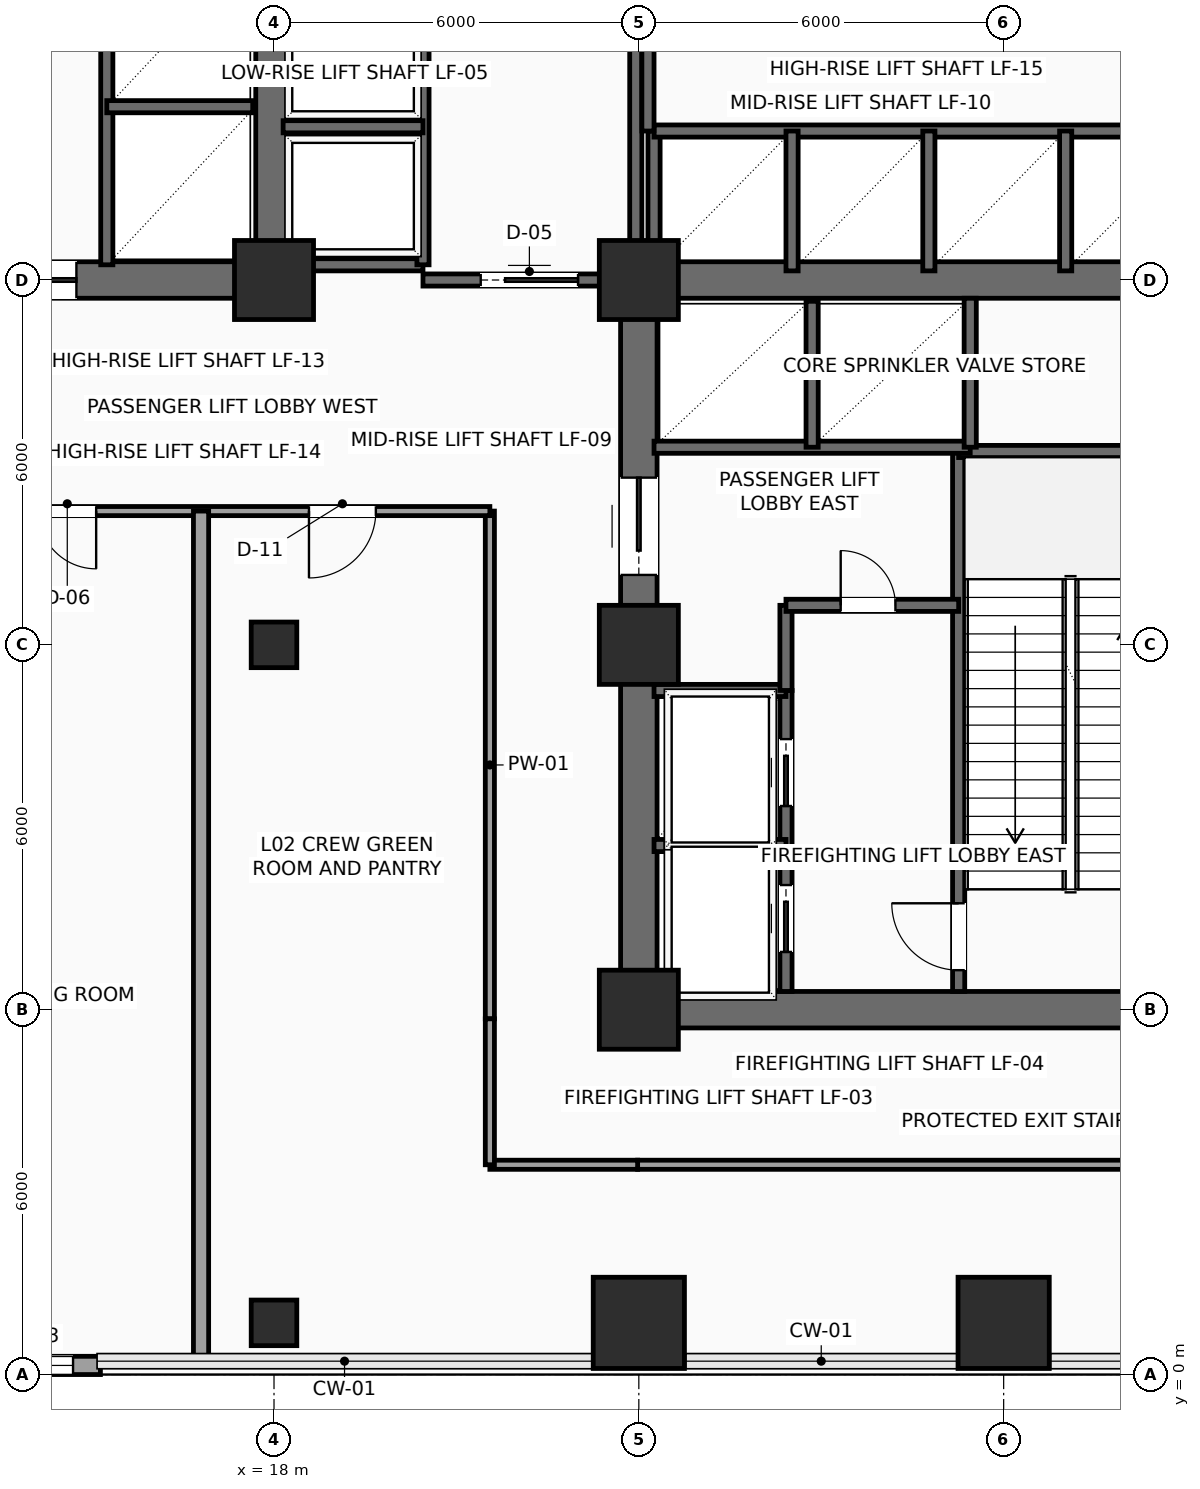
"""IFC4 building model, lengths in metres.
Left out: names, types, materials, properties, quantities, classifications, styles, units other than length and angle.
Written with IfcOpenShell. Run it as: python <this file> out.ifc"""

import sys

from ifc_helpers import new_model, si_unit, direction, frame, frame_2d, origin, origin_2d, place, context, subcontext, project, spatial, rectangle, hollow_rectangle, extrude, element, fill, save


model = new_model("IFC4")
c1 = context("Model", 3, precision=1e-05, world=origin(), true_north=direction((0.0, 1.0)))
c2 = subcontext(c1, "Body", "Model", "MODEL_VIEW")
j1 = project(units=[si_unit("LENGTHUNIT", "METRE"), si_unit("PLANEANGLEUNIT", "RADIAN")], contexts=[c1])
p1 = place(None, origin())
s1 = spatial("IfcSite", under=j1, at=p1, CompositionType="ELEMENT")
p2 = place(p1, origin())
s2 = spatial("IfcBuilding", under=s1, at=p2, CompositionType="ELEMENT")
p3 = place(p2, frame((0.0, 0.0, 11.1)))
s3 = spatial("IfcBuildingStorey", under=s2, at=p3, CompositionType="ELEMENT", Elevation=11.1)
for number, where, z_axis, x_axis in (
    (1, (18.0, 18.0, 0.0), (0.0, 0.0, 1.0), (1.0, 0.0, 0.0)),
    (2, (24.0, 6.0, 0.0), (0.0, 0.0, 1.0), (1.0, 0.0, 0.0)),
    (3, (24.0, 12.0, 0.0), (0.0, 0.0, 1.0), (1.0, 0.0, 0.0)),
    (4, (24.0, 18.0, 0.0), (0.0, 0.0, 1.0), (1.0, 0.0, 0.0)),
):
    element("IfcColumn", number, at=place(p3, frame(where, z_axis=z_axis, x_axis=x_axis)), inside=s3, PredefinedType="COLUMN", context=c2, shape_type="SweptSolid", body=[
        extrude(rectangle(XDim=1.3, YDim=1.3, at=origin_2d()), origin(), (0.0, 0.0, 1.0), 5.4),
    ])
for number, where, z_axis, x_axis in (
    (5, (18.0, 0.85, 0.0), (0.0, 0.0, 1.0), (1.0, 0.0, 0.0)),
    (6, (18.0, 12.0, 0.0), (0.0, 0.0, 1.0), (1.0, 0.0, 0.0)),
):
    element("IfcColumn", number, at=place(p3, frame(where, z_axis=z_axis, x_axis=x_axis)), inside=s3, PredefinedType="COLUMN", context=c2, shape_type="SweptSolid", body=[
        extrude(hollow_rectangle(XDim=0.75, YDim=0.75, WallThickness=0.035, InnerFilletRadius=0.035, OuterFilletRadius=0.05, at=origin_2d()), origin(), (0.0, 0.0, 1.0), 5.4),
    ])
for number, where, z_axis, x_axis in (
    (7, (24.0, 0.85, 0.0), (0.0, 0.0, 1.0), (1.0, 0.0, 0.0)),
    (8, (30.0, 0.85, 0.0), (0.0, 0.0, 1.0), (1.0, 0.0, 0.0)),
):
    element("IfcColumn", number, at=place(p3, frame(where, z_axis=z_axis, x_axis=x_axis)), inside=s3, PredefinedType="COLUMN", context=c2, shape_type="SweptSolid", body=[
        extrude(rectangle(XDim=1.5, YDim=1.5, at=origin_2d()), origin(), (0.0, 0.0, 1.0), 5.4),
    ])
p4 = place(p3, frame((15.145, 0.15, 0.0), z_axis=(0.0, 0.0, 1.0), x_axis=(-1.0, 0.0, 0.0)))
e9 = element("IfcWall", 9, at=p4, inside=s3, PredefinedType="SOLIDWALL", context=c2, shape_type="SweptSolid", body=[
    extrude(rectangle(XDim=12.145, YDim=0.3, at=frame_2d((6.073, 0.0))), origin(), (0.0, 0.0, 1.0), 5.1),
])
p5 = place(p4, frame((0.45, 0.0, 1.0)))
e10 = element("IfcOpeningElement", 10, at=p5, cuts=e9, PredefinedType="OPENING", context=c2, shape_type="SweptSolid", body=[
    extrude(rectangle(XDim=1.5, YDim=1.8, at=frame_2d((0.75, 0.9))), frame((0.0, 0.16, 0.0), z_axis=(0.0, -1.0, 0.0), x_axis=(1.0, 0.0, 0.0)), (0.0, 0.0, 1.0), 0.32),
])
p6 = place(p3, frame((6.0, 18.0, 0.0), z_axis=(0.0, 0.0, 1.0), x_axis=(1.0, 0.0, 0.0)))
e11 = element("IfcWall", 11, at=p6, inside=s3, PredefinedType="SHEAR", context=c2, shape_type="SweptSolid", body=[
    extrude(rectangle(XDim=12.0, YDim=0.6, at=frame_2d((6.0, 0.0))), origin(), (0.0, 0.0, 1.0), 5.1),
])
p7 = place(p6, frame((7.15, 0.0, 0.0)))
e12 = element("IfcOpeningElement", 12, at=p7, cuts=e11, PredefinedType="OPENING", context=c2, shape_type="SweptSolid", body=[
    extrude(rectangle(XDim=1.6, YDim=2.3, at=frame_2d((0.8, 1.15))), frame((0.0, 0.31, 0.0), z_axis=(0.0, -1.0, 0.0), x_axis=(1.0, 0.0, 0.0)), (0.0, 0.0, 1.0), 0.62),
])
for number, where, z_axis, x_axis in (
    (13, (18.0, 18.0, 0.0), (0.0, 0.0, 1.0), (0.0, 1.0, 0.0)),
    (14, (24.0, 6.0, 0.0), (0.0, 0.0, 1.0), (1.0, 0.0, 0.0)),
    (15, (24.0, 18.0, 0.0), (0.0, 0.0, 1.0), (1.0, 0.0, 0.0)),
):
    element("IfcWall", number, at=place(p3, frame(where, z_axis=z_axis, x_axis=x_axis)), inside=s3, PredefinedType="SHEAR", context=c2, shape_type="SweptSolid", body=[
        extrude(rectangle(XDim=9.6, YDim=0.6, at=frame_2d((4.8, 0.0))), origin(), (0.0, 0.0, 1.0), 5.1),
    ])
p8 = place(p3, frame((24.0, 6.0, 0.0), z_axis=(0.0, 0.0, 1.0), x_axis=(0.0, 1.0, 0.0)))
e16 = element("IfcWall", 16, at=p8, inside=s3, PredefinedType="SHEAR", context=c2, shape_type="SweptSolid", body=[
    extrude(rectangle(XDim=12.0, YDim=0.6, at=frame_2d((6.0, 0.0))), origin(), (0.0, 0.0, 1.0), 5.1),
])
p9 = place(p8, frame((7.15, 0.0, 0.0)))
e17 = element("IfcOpeningElement", 17, at=p9, cuts=e16, PredefinedType="OPENING", context=c2, shape_type="SweptSolid", body=[
    extrude(rectangle(XDim=1.6, YDim=2.3, at=frame_2d((0.8, 1.15))), frame((0.0, 0.31, 0.0), z_axis=(0.0, -1.0, 0.0), x_axis=(1.0, 0.0, 0.0)), (0.0, 0.0, 1.0), 0.62),
])
p10 = place(p3, frame((29.26, 6.3, 0.0), z_axis=(0.0, 0.0, 1.0), x_axis=(0.0, 1.0, 0.0)))
e18 = element("IfcWall", 18, at=p10, inside=s3, PredefinedType="SHEAR", context=c2, shape_type="SweptSolid", body=[
    extrude(rectangle(XDim=8.88, YDim=0.2, at=frame_2d((4.44, 0.0))), origin(), (0.0, 0.0, 1.0), 5.1),
])
p11 = place(p10, frame((0.35, 0.0, 0.0)))
e19 = element("IfcOpeningElement", 19, at=p11, cuts=e18, PredefinedType="OPENING", context=c2, shape_type="SweptSolid", body=[
    extrude(rectangle(XDim=1.1, YDim=2.2, at=frame_2d((0.55, 1.1))), frame((0.0, 0.11, 0.0), z_axis=(0.0, -1.0, 0.0), x_axis=(1.0, 0.0, 0.0)), (0.0, 0.0, 1.0), 0.22),
])
p12 = place(p3, frame((29.26, 15.18, 0.0), z_axis=(0.0, 0.0, 1.0), x_axis=(1.0, 0.0, 0.0)))
e20 = element("IfcWall", 20, at=p12, inside=s3, PredefinedType="SHEAR", context=c2, shape_type="SweptSolid", body=[
    extrude(rectangle(XDim=4.04, YDim=0.2, at=frame_2d((2.02, 0.0))), origin(), (0.0, 0.0, 1.0), 5.1),
])
p13 = place(p3, frame((26.42, 6.3, 0.0), z_axis=(0.0, 0.0, 1.0), x_axis=(0.0, 1.0, 0.0)))
e21 = element("IfcWall", 21, at=p13, inside=s3, PredefinedType="SHEAR", context=c2, shape_type="SweptSolid", body=[
    extrude(rectangle(XDim=4.95, YDim=0.2, at=frame_2d((2.475, 0.0))), origin(), (0.0, 0.0, 1.0), 5.1),
])
p14 = place(p13, frame((0.65, 0.0, 0.0)))
e22 = element("IfcOpeningElement", 22, at=p14, cuts=e21, PredefinedType="OPENING", context=c2, shape_type="SweptSolid", body=[
    extrude(rectangle(XDim=1.1, YDim=2.2, at=frame_2d((0.55, 1.1))), frame((0.0, 0.11, 0.0), z_axis=(0.0, -1.0, 0.0), x_axis=(1.0, 0.0, 0.0)), (0.0, 0.0, 1.0), 0.22),
])
p15 = place(p13, frame((3.05, 0.0, 0.0)))
e23 = element("IfcOpeningElement", 23, at=p15, cuts=e21, PredefinedType="OPENING", context=c2, shape_type="SweptSolid", body=[
    extrude(rectangle(XDim=1.1, YDim=2.2, at=frame_2d((0.55, 1.1))), frame((0.0, 0.11, 0.0), z_axis=(0.0, -1.0, 0.0), x_axis=(1.0, 0.0, 0.0)), (0.0, 0.0, 1.0), 0.22),
])
for number, where, z_axis, x_axis in (
    (24, (24.25, 8.7, 0.0), (0.0, 0.0, 1.0), (1.0, 0.0, 0.0)),
    (25, (24.25, 11.25, 0.0), (0.0, 0.0, 1.0), (1.0, 0.0, 0.0)),
):
    element("IfcWall", number, at=place(p3, frame(where, z_axis=z_axis, x_axis=x_axis)), inside=s3, PredefinedType="SHEAR", context=c2, shape_type="SweptSolid", body=[
        extrude(rectangle(XDim=2.17, YDim=0.2, at=frame_2d((1.085, 0.0))), origin(), (0.0, 0.0, 1.0), 5.1),
    ])
p16 = place(p3, frame((26.42, 11.25, 0.0), z_axis=(0.0, 0.0, 1.0), x_axis=(0.0, 1.0, 0.0)))
e26 = element("IfcWall", 26, at=p16, inside=s3, PredefinedType="SHEAR", context=c2, shape_type="SweptSolid", body=[
    extrude(rectangle(XDim=1.4, YDim=0.2, at=frame_2d((0.7, 0.0))), origin(), (0.0, 0.0, 1.0), 5.1),
])
p17 = place(p3, frame((26.42, 12.65, 0.0), z_axis=(0.0, 0.0, 1.0), x_axis=(1.0, 0.0, 0.0)))
e27 = element("IfcWall", 27, at=p17, inside=s3, PredefinedType="SHEAR", context=c2, shape_type="SweptSolid", body=[
    extrude(rectangle(XDim=2.84, YDim=0.2, at=frame_2d((1.42, 0.0))), origin(), (0.0, 0.0, 1.0), 5.1),
])
p18 = place(p17, frame((0.9, 0.0, 0.0)))
e28 = element("IfcOpeningElement", 28, at=p18, cuts=e27, PredefinedType="OPENING", context=c2, shape_type="SweptSolid", body=[
    extrude(rectangle(XDim=0.9, YDim=2.15, at=frame_2d((0.45, 1.075))), frame((0.0, 0.11, 0.0), z_axis=(0.0, -1.0, 0.0), x_axis=(1.0, 0.0, 0.0)), (0.0, 0.0, 1.0), 0.22),
])
p19 = place(p3, frame((15.25, 18.25, 0.0), z_axis=(0.0, 0.0, 1.0), x_axis=(0.0, 1.0, 0.0)))
e29 = element("IfcWall", 29, at=p19, inside=s3, PredefinedType="SHEAR", context=c2, shape_type="SweptSolid", body=[
    extrude(rectangle(XDim=5.2, YDim=0.2, at=frame_2d((2.6, 0.0))), origin(), (0.0, 0.0, 1.0), 5.1),
])
p20 = place(p3, frame((15.25, 20.85, 0.0), z_axis=(0.0, 0.0, 1.0), x_axis=(1.0, 0.0, 0.0)))
e30 = element("IfcWall", 30, at=p20, inside=s3, PredefinedType="SHEAR", context=c2, shape_type="SweptSolid", body=[
    extrude(rectangle(XDim=2.4, YDim=0.2, at=frame_2d((1.2, 0.0))), origin(), (0.0, 0.0, 1.0), 5.1),
])
p21 = place(p3, frame((24.25, 15.25, 0.0), z_axis=(0.0, 0.0, 1.0), x_axis=(1.0, 0.0, 0.0)))
e31 = element("IfcWall", 31, at=p21, inside=s3, PredefinedType="SHEAR", context=c2, shape_type="SweptSolid", body=[
    extrude(rectangle(XDim=5.2, YDim=0.2, at=frame_2d((2.6, 0.0))), origin(), (0.0, 0.0, 1.0), 5.1),
])
p22 = place(p3, frame((26.85, 15.25, 0.0), z_axis=(0.0, 0.0, 1.0), x_axis=(0.0, 1.0, 0.0)))
e32 = element("IfcWall", 32, at=p22, inside=s3, PredefinedType="SHEAR", context=c2, shape_type="SweptSolid", body=[
    extrude(rectangle(XDim=2.4, YDim=0.2, at=frame_2d((1.2, 0.0))), origin(), (0.0, 0.0, 1.0), 5.1),
])
p23 = place(p3, frame((29.45, 15.25, 0.0), z_axis=(0.0, 0.0, 1.0), x_axis=(0.0, 1.0, 0.0)))
e33 = element("IfcWall", 33, at=p23, inside=s3, PredefinedType="SHEAR", context=c2, shape_type="SweptSolid", body=[
    extrude(rectangle(XDim=2.45, YDim=0.2, at=frame_2d((1.225, 0.0))), origin(), (0.0, 0.0, 1.0), 5.1),
])
p24 = place(p3, frame((18.1, 18.25, 0.0), z_axis=(0.0, 0.0, 1.0), x_axis=(1.0, 0.0, 0.0)))
e34 = element("IfcWall", 34, at=p24, inside=s3, PredefinedType="SHEAR", context=c2, shape_type="SweptSolid", body=[
    extrude(rectangle(XDim=2.35, YDim=0.2, at=frame_2d((1.175, 0.0))), origin(), (0.0, 0.0, 1.0), 5.1),
])
p25 = place(p3, frame((20.45, 18.25, 0.0), z_axis=(0.0, 0.0, 1.0), x_axis=(0.0, 1.0, 0.0)))
e35 = element("IfcWall", 35, at=p25, inside=s3, PredefinedType="SHEAR", context=c2, shape_type="SweptSolid", body=[
    extrude(rectangle(XDim=9.05, YDim=0.2, at=frame_2d((4.525, 0.0))), origin(), (0.0, 0.0, 1.0), 5.1),
])
p26 = place(p3, frame((18.15, 20.52, 0.0), z_axis=(0.0, 0.0, 1.0), x_axis=(1.0, 0.0, 0.0)))
e36 = element("IfcWall", 36, at=p26, inside=s3, PredefinedType="SHEAR", context=c2, shape_type="SweptSolid", body=[
    extrude(rectangle(XDim=2.3, YDim=0.2, at=frame_2d((1.15, 0.0))), origin(), (0.0, 0.0, 1.0), 5.1),
])
p27 = place(p3, frame((20.45, 18.0, 0.0), z_axis=(0.0, 0.0, 1.0), x_axis=(1.0, 0.0, 0.0)))
e37 = element("IfcWall", 37, at=p27, inside=s3, PredefinedType="SHEAR", context=c2, shape_type="SweptSolid", body=[
    extrude(rectangle(XDim=3.5, YDim=0.2, at=frame_2d((1.75, 0.0))), origin(), (0.0, 0.0, 1.0), 5.1),
])
p28 = place(p27, frame((0.95, 0.0, 0.0)))
e38 = element("IfcOpeningElement", 38, at=p28, cuts=e37, PredefinedType="OPENING", context=c2, shape_type="SweptSolid", body=[
    extrude(rectangle(XDim=1.6, YDim=2.3, at=frame_2d((0.8, 1.15))), frame((0.0, 0.11, 0.0), z_axis=(0.0, -1.0, 0.0), x_axis=(1.0, 0.0, 0.0)), (0.0, 0.0, 1.0), 0.22),
])
p29 = place(p3, frame((23.95, 18.0, 0.0), z_axis=(0.0, 0.0, 1.0), x_axis=(0.0, 1.0, 0.0)))
e39 = element("IfcWall", 39, at=p29, inside=s3, PredefinedType="SHEAR", context=c2, shape_type="SweptSolid", body=[
    extrude(rectangle(XDim=9.3, YDim=0.2, at=frame_2d((4.65, 0.0))), origin(), (0.0, 0.0, 1.0), 5.1),
])
p30 = place(p3, frame((24.25, 18.1, 0.0), z_axis=(0.0, 0.0, 1.0), x_axis=(0.0, 1.0, 0.0)))
e40 = element("IfcWall", 40, at=p30, inside=s3, PredefinedType="SHEAR", context=c2, shape_type="SweptSolid", body=[
    extrude(rectangle(XDim=2.35, YDim=0.2, at=frame_2d((1.175, 0.0))), origin(), (0.0, 0.0, 1.0), 5.1),
])
p31 = place(p3, frame((24.25, 20.45, 0.0), z_axis=(0.0, 0.0, 1.0), x_axis=(1.0, 0.0, 0.0)))
e41 = element("IfcWall", 41, at=p31, inside=s3, PredefinedType="SHEAR", context=c2, shape_type="SweptSolid", body=[
    extrude(rectangle(XDim=9.05, YDim=0.2, at=frame_2d((4.525, 0.0))), origin(), (0.0, 0.0, 1.0), 5.1),
])
for number, where, z_axis, x_axis in (
    (42, (26.52, 18.15, 0.0), (0.0, 0.0, 1.0), (0.0, 1.0, 0.0)),
    (43, (28.77, 18.15, 0.0), (0.0, 0.0, 1.0), (0.0, 1.0, 0.0)),
    (44, (31.02, 18.15, 0.0), (0.0, 0.0, 1.0), (0.0, 1.0, 0.0)),
):
    element("IfcWall", number, at=place(p3, frame(where, z_axis=z_axis, x_axis=x_axis)), inside=s3, PredefinedType="SHEAR", context=c2, shape_type="SweptSolid", body=[
        extrude(rectangle(XDim=2.3, YDim=0.2, at=frame_2d((1.15, 0.0))), origin(), (0.0, 0.0, 1.0), 5.1),
    ])
p32 = place(p3, frame((24.15, 20.45, 0.0), z_axis=(0.0, 0.0, 1.0), x_axis=(0.0, 1.0, 0.0)))
e45 = element("IfcWall", 45, at=p32, inside=s3, PredefinedType="SHEAR", context=c2, shape_type="SweptSolid", body=[
    extrude(rectangle(XDim=3.05, YDim=0.2, at=frame_2d((1.525, 0.0))), origin(), (0.0, 0.0, 1.0), 5.1),
])
p33 = place(p3, frame((21.55, 5.85, 0.0), z_axis=(0.0, 0.0, 1.0), x_axis=(0.0, 1.0, 0.0)))
e46 = element("IfcWall", 46, at=p33, inside=s3, PredefinedType="PARTITIONING", context=c2, shape_type="SweptSolid", body=[
    extrude(rectangle(XDim=8.35, YDim=0.15, at=frame_2d((4.175, 0.0))), origin(), (0.0, 0.0, 1.0), 5.1),
])
p34 = place(p3, frame((21.55, 14.2, 0.0), z_axis=(0.0, 0.0, 1.0), x_axis=(-1.0, 0.0, 0.0)))
e47 = element("IfcWall", 47, at=p34, inside=s3, PredefinedType="PARTITIONING", context=c2, shape_type="SweptSolid", body=[
    extrude(rectangle(XDim=9.15, YDim=0.15, at=frame_2d((4.575, 0.0))), origin(), (0.0, 0.0, 1.0), 5.1),
])
p35 = place(p34, frame((6.475, 0.0, 0.0)))
e48 = element("IfcOpeningElement", 48, at=p35, cuts=e47, PredefinedType="OPENING", context=c2, shape_type="SweptSolid", body=[
    extrude(rectangle(XDim=0.95, YDim=2.15, at=frame_2d((0.475, 1.075))), frame((0.0, 0.085, 0.0), z_axis=(0.0, -1.0, 0.0), x_axis=(1.0, 0.0, 0.0)), (0.0, 0.0, 1.0), 0.17),
])
p36 = place(p34, frame((1.875, 0.0, 0.0)))
e49 = element("IfcOpeningElement", 49, at=p36, cuts=e47, PredefinedType="OPENING", context=c2, shape_type="SweptSolid", body=[
    extrude(rectangle(XDim=1.1, YDim=2.25, at=frame_2d((0.55, 1.125))), frame((0.0, 0.085, 0.0), z_axis=(0.0, -1.0, 0.0), x_axis=(1.0, 0.0, 0.0)), (0.0, 0.0, 1.0), 0.17),
])
p37 = place(p3, frame((36.15, 3.45, 0.0), z_axis=(0.0, 0.0, 1.0), x_axis=(-1.0, 0.0, 0.0)))
e50 = element("IfcWall", 50, at=p37, inside=s3, PredefinedType="PARTITIONING", context=c2, shape_type="SweptSolid", body=[
    extrude(rectangle(XDim=12.17, YDim=0.15, at=frame_2d((6.085, 0.0))), origin(), (0.0, 0.0, 1.0), 4.492),
])
p38 = place(p3, frame((23.98, 3.45, 0.0), z_axis=(0.0, 0.0, 1.0), x_axis=(-1.0, 0.0, 0.0)))
e51 = element("IfcWall", 51, at=p38, inside=s3, PredefinedType="PARTITIONING", context=c2, shape_type="SweptSolid", body=[
    extrude(rectangle(XDim=2.43, YDim=0.15, at=frame_2d((1.215, 0.0))), origin(), (0.0, 0.0, 1.0), 4.492),
])
p39 = place(p3, frame((21.55, 3.45, 0.0), z_axis=(0.0, 0.0, 1.0), x_axis=(0.0, 1.0, 0.0)))
e52 = element("IfcWall", 52, at=p39, inside=s3, PredefinedType="PARTITIONING", context=c2, shape_type="SweptSolid", body=[
    extrude(rectangle(XDim=2.4, YDim=0.15, at=frame_2d((1.2, 0.0))), origin(), (0.0, 0.0, 1.0), 5.1),
])
p40 = place(p3, frame((16.8, 0.22, 0.0), z_axis=(0.0, 0.0, 1.0), x_axis=(0.0, 1.0, 0.0)))
e53 = element("IfcWall", 53, at=p40, inside=s3, PredefinedType="PARTITIONING", context=c2, shape_type="SweptSolid", body=[
    extrude(rectangle(XDim=13.98, YDim=0.25, at=frame_2d((6.99, 0.0))), origin(), (0.0, 0.0, 1.0), 5.1),
])
p41 = place(p5, origin())
e54 = element("IfcWindow", 54, at=p41, inside=s3, PartitioningType="SINGLE_PANEL", PredefinedType="WINDOW", context=c2, shape_type="SweptSolid", body=[
    extrude(rectangle(XDim=1.5, YDim=1.8, at=frame_2d((0.75, 0.9))), frame((0.0, 0.03, 0.0), z_axis=(0.0, -1.0, 0.0), x_axis=(1.0, 0.0, 0.0)), (0.0, 0.0, 1.0), 0.06),
])
fill(e10, e54)
p42 = place(p7, origin())
e55 = element("IfcDoor", 55, at=p42, inside=s3, OperationType="DOUBLE_DOOR_SLIDING", PredefinedType="DOOR", context=c2, shape_type="SweptSolid", body=[
    extrude(rectangle(XDim=1.6, YDim=2.3, at=frame_2d((0.8, 1.15))), frame((0.0, 0.025, 0.0), z_axis=(0.0, -1.0, 0.0), x_axis=(1.0, 0.0, 0.0)), (0.0, 0.0, 1.0), 0.05),
])
fill(e12, e55)
p43 = place(p9, origin())
e56 = element("IfcDoor", 56, at=p43, inside=s3, OperationType="DOUBLE_DOOR_SLIDING", PredefinedType="DOOR", context=c2, shape_type="SweptSolid", body=[
    extrude(rectangle(XDim=1.6, YDim=2.3, at=frame_2d((0.8, 1.15))), frame((0.0, 0.025, 0.0), z_axis=(0.0, -1.0, 0.0), x_axis=(1.0, 0.0, 0.0)), (0.0, 0.0, 1.0), 0.05),
])
fill(e17, e56)
p44 = place(p11, origin())
e57 = element("IfcDoor", 57, at=p44, inside=s3, OperationType="SINGLE_SWING_RIGHT", PredefinedType="DOOR", context=c2, shape_type="SweptSolid", body=[
    extrude(rectangle(XDim=1.1, YDim=2.2, at=frame_2d((0.55, 1.1))), frame((0.0, 0.025, 0.0), z_axis=(0.0, -1.0, 0.0), x_axis=(1.0, 0.0, 0.0)), (0.0, 0.0, 1.0), 0.05),
])
fill(e19, e57)
p45 = place(p14, origin())
e58 = element("IfcDoor", 58, at=p45, inside=s3, OperationType="SLIDING_TO_LEFT", PredefinedType="DOOR", context=c2, shape_type="SweptSolid", body=[
    extrude(rectangle(XDim=1.1, YDim=2.2, at=frame_2d((0.55, 1.1))), frame((0.0, 0.025, 0.0), z_axis=(0.0, -1.0, 0.0), x_axis=(1.0, 0.0, 0.0)), (0.0, 0.0, 1.0), 0.05),
])
fill(e22, e58)
p46 = place(p15, origin())
e59 = element("IfcDoor", 59, at=p46, inside=s3, OperationType="SLIDING_TO_LEFT", PredefinedType="DOOR", context=c2, shape_type="SweptSolid", body=[
    extrude(rectangle(XDim=1.1, YDim=2.2, at=frame_2d((0.55, 1.1))), frame((0.0, 0.025, 0.0), z_axis=(0.0, -1.0, 0.0), x_axis=(1.0, 0.0, 0.0)), (0.0, 0.0, 1.0), 0.05),
])
fill(e23, e59)
p47 = place(p18, origin())
e60 = element("IfcDoor", 60, at=p47, inside=s3, OperationType="SINGLE_SWING_LEFT", PredefinedType="DOOR", context=c2, shape_type="SweptSolid", body=[
    extrude(rectangle(XDim=0.9, YDim=2.15, at=frame_2d((0.45, 1.075))), frame((0.0, 0.025, 0.0), z_axis=(0.0, -1.0, 0.0), x_axis=(1.0, 0.0, 0.0)), (0.0, 0.0, 1.0), 0.05),
])
fill(e28, e60)
p48 = place(p28, origin())
e61 = element("IfcDoor", 61, at=p48, inside=s3, OperationType="DOUBLE_DOOR_SLIDING", PredefinedType="DOOR", context=c2, shape_type="SweptSolid", body=[
    extrude(rectangle(XDim=1.6, YDim=2.3, at=frame_2d((0.8, 1.15))), frame((0.0, 0.025, 0.0), z_axis=(0.0, -1.0, 0.0), x_axis=(1.0, 0.0, 0.0)), (0.0, 0.0, 1.0), 0.05),
])
fill(e38, e61)
p49 = place(p35, origin())
e62 = element("IfcDoor", 62, at=p49, inside=s3, OperationType="SINGLE_SWING_LEFT", PredefinedType="DOOR", context=c2, shape_type="SweptSolid", body=[
    extrude(rectangle(XDim=0.95, YDim=2.15, at=frame_2d((0.475, 1.075))), frame((0.0, 0.025, 0.0), z_axis=(0.0, -1.0, 0.0), x_axis=(1.0, 0.0, 0.0)), (0.0, 0.0, 1.0), 0.05),
])
fill(e48, e62)
p50 = place(p36, origin())
e63 = element("IfcDoor", 63, at=p50, inside=s3, OperationType="SINGLE_SWING_RIGHT", PredefinedType="DOOR", context=c2, shape_type="SweptSolid", body=[
    extrude(rectangle(XDim=1.1, YDim=2.25, at=frame_2d((0.55, 1.125))), frame((0.0, 0.025, 0.0), z_axis=(0.0, -1.0, 0.0), x_axis=(1.0, 0.0, 0.0)), (0.0, 0.0, 1.0), 0.05),
])
fill(e49, e63)
save(model, sys.argv[1])
